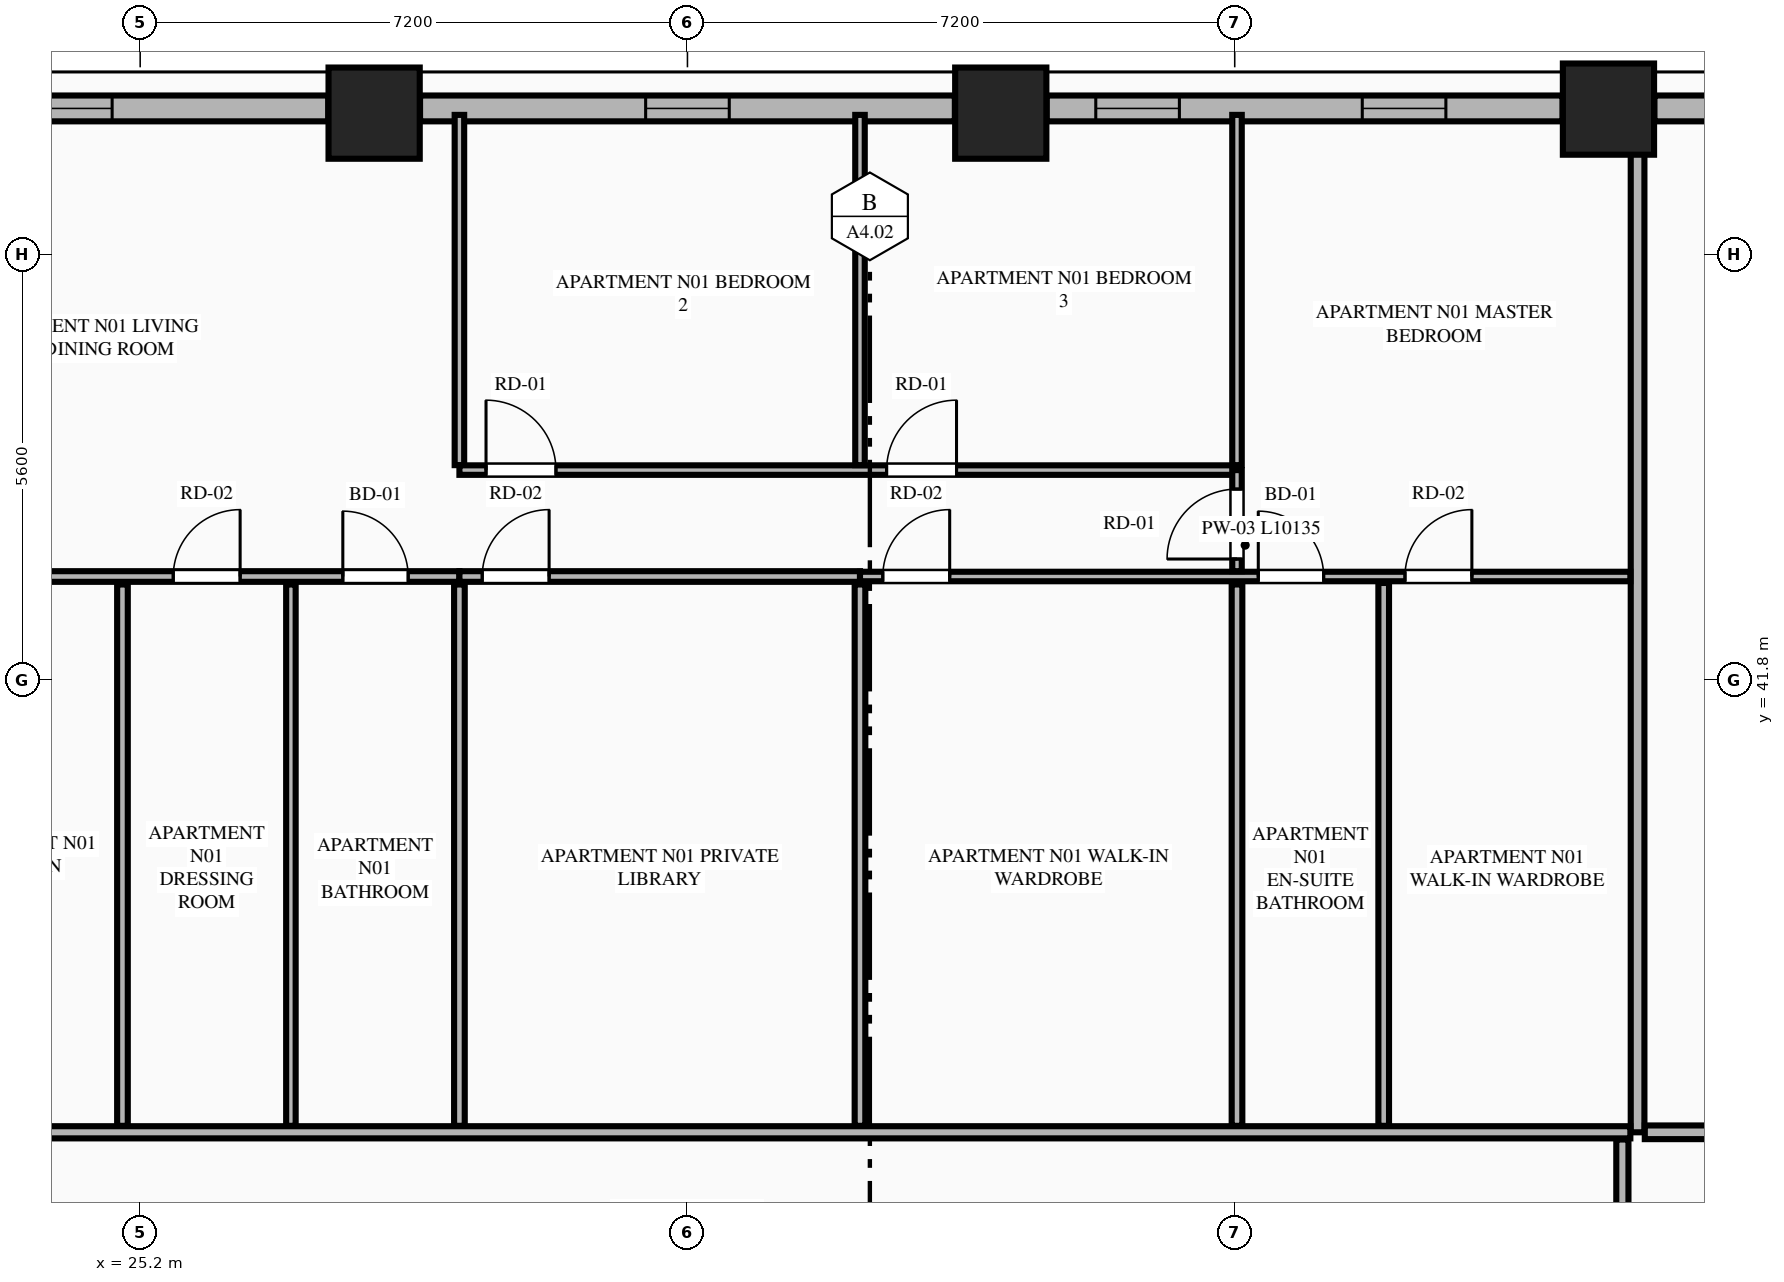
"""IFC4 building model, lengths in metres.
Left out: names, types, materials, properties, quantities, classifications, styles, units other than length and angle.
Written with IfcOpenShell. Run it as: python <this file> out.ifc"""

import sys

from ifc_helpers import new_model, si_unit, direction, frame, frame_2d, origin, origin_2d, place, context, subcontext, project, spatial, rectangle, extrude, element, fill, save


model = new_model("IFC4")
c1 = context("Model", 3, precision=1e-05, world=origin(), true_north=direction((0.0, 1.0)))
c2 = subcontext(c1, "Body", "Model", "MODEL_VIEW")
j1 = project(units=[si_unit("LENGTHUNIT", "METRE"), si_unit("PLANEANGLEUNIT", "RADIAN")], contexts=[c1])
p1 = place(None, origin())
s1 = spatial("IfcSite", under=j1, at=p1, CompositionType="ELEMENT")
p2 = place(p1, origin())
s2 = spatial("IfcBuilding", under=s1, at=p2, CompositionType="ELEMENT")
p3 = place(p2, frame((0.0, 0.0, 39.1)))
s3 = spatial("IfcBuildingStorey", under=s2, at=p3, CompositionType="ELEMENT", Elevation=39.1)
for number, where, z_axis, x_axis in (
    (1, (44.517, 49.311, 0.0), (0.0, 0.0, 1.0), (1.0, 0.0, 0.0)),
    (2, (36.522, 49.258, 0.0), (0.0, 0.0, 1.0), (1.0, 0.0, 0.0)),
    (3, (28.278, 49.258, 0.0), (0.0, 0.0, 1.0), (1.0, 0.0, 0.0)),
):
    element("IfcColumn", number, at=place(p3, frame(where, z_axis=z_axis, x_axis=x_axis)), inside=s3, PredefinedType="COLUMN", context=c2, shape_type="SweptSolid", body=[
        extrude(rectangle(XDim=1.2, YDim=1.2, at=origin_2d()), origin(), (0.0, 0.0, 1.0), 3.55),
    ])
p4 = place(p3, frame((46.366, 49.32, 0.0), z_axis=(0.0, 0.0, 1.0), x_axis=(-1.0, 0.0, 0.0)))
e4 = element("IfcWall", 4, at=p4, inside=s3, PredefinedType="STANDARD", context=c2, shape_type="SweptSolid", body=[
    extrude(rectangle(XDim=1.245, YDim=0.34, at=frame_2d((0.623, 0.0))), origin(), (0.0, 0.0, 1.0), 3.33),
])
p5 = place(p3, frame((43.913, 49.32, 0.0), z_axis=(0.0, 0.0, 1.0), x_axis=(-1.0, 0.0, 0.0)))
e5 = element("IfcWall", 5, at=p5, inside=s3, PredefinedType="STANDARD", context=c2, shape_type="SweptSolid", body=[
    extrude(rectangle(XDim=6.787, YDim=0.34, at=frame_2d((3.394, 0.0))), origin(), (0.0, 0.0, 1.0), 2.787),
])
p6 = place(p5, frame((1.535, 0.0, 0.75)))
e6 = element("IfcOpeningElement", 6, at=p6, cuts=e5, PredefinedType="OPENING", context=c2, shape_type="SweptSolid", body=[
    extrude(rectangle(XDim=1.1, YDim=1.887, at=frame_2d((0.55, 0.943))), frame((0.0, 0.18, 0.0), z_axis=(0.0, -1.0, 0.0), x_axis=(1.0, 0.0, 0.0)), (0.0, 0.0, 1.0), 0.36),
])
p7 = place(p5, frame((5.041, 0.0, 0.75)))
e7 = element("IfcOpeningElement", 7, at=p7, cuts=e5, PredefinedType="OPENING", context=c2, shape_type="SweptSolid", body=[
    extrude(rectangle(XDim=1.1, YDim=1.887, at=frame_2d((0.55, 0.943))), frame((0.0, 0.18, 0.0), z_axis=(0.0, -1.0, 0.0), x_axis=(1.0, 0.0, 0.0)), (0.0, 0.0, 1.0), 0.36),
])
p8 = place(p3, frame((35.918, 49.32, 0.0), z_axis=(0.0, 0.0, 1.0), x_axis=(-1.0, 0.0, 0.0)))
e8 = element("IfcWall", 8, at=p8, inside=s3, PredefinedType="STANDARD", context=c2, shape_type="SweptSolid", body=[
    extrude(rectangle(XDim=7.036, YDim=0.34, at=frame_2d((3.518, 0.0))), origin(), (0.0, 0.0, 1.0), 2.787),
])
p9 = place(p8, frame((2.968, 0.0, 0.75)))
e9 = element("IfcOpeningElement", 9, at=p9, cuts=e8, PredefinedType="OPENING", context=c2, shape_type="SweptSolid", body=[
    extrude(rectangle(XDim=1.1, YDim=1.887, at=frame_2d((0.55, 0.943))), frame((0.0, 0.18, 0.0), z_axis=(0.0, -1.0, 0.0), x_axis=(1.0, 0.0, 0.0)), (0.0, 0.0, 1.0), 0.36),
])
p10 = place(p3, frame((27.674, 49.32, 0.0), z_axis=(0.0, 0.0, 1.0), x_axis=(-1.0, 0.0, 0.0)))
e10 = element("IfcWall", 10, at=p10, inside=s3, PredefinedType="STANDARD", context=c2, shape_type="SweptSolid", body=[
    extrude(rectangle(XDim=6.787, YDim=0.34, at=frame_2d((3.394, 0.0))), origin(), (0.0, 0.0, 1.0), 2.787),
])
p11 = place(p10, frame((2.843, 0.0, 0.75)))
e11 = element("IfcOpeningElement", 11, at=p11, cuts=e10, PredefinedType="OPENING", context=c2, shape_type="SweptSolid", body=[
    extrude(rectangle(XDim=1.1, YDim=1.887, at=frame_2d((0.55, 0.943))), frame((0.0, 0.18, 0.0), z_axis=(0.0, -1.0, 0.0), x_axis=(1.0, 0.0, 0.0)), (0.0, 0.0, 1.0), 0.36),
])
p12 = place(p3, frame((44.9, 35.85, 0.0), z_axis=(0.0, 0.0, 1.0), x_axis=(0.0, 1.0, 0.0)))
e12 = element("IfcWall", 12, at=p12, inside=s3, PredefinedType="PARTITIONING", context=c2, shape_type="SweptSolid", body=[
    extrude(rectangle(XDim=13.295, YDim=0.18, at=frame_2d((6.647, 0.0))), origin(), (0.0, 0.0, 1.0), 3.33),
])
p13 = place(p3, frame((19.995, 35.85, 0.0), z_axis=(0.0, 0.0, 1.0), x_axis=(1.0, 0.0, 0.0)))
e13 = element("IfcWall", 13, at=p13, inside=s3, PredefinedType="PARTITIONING", context=c2, shape_type="SweptSolid", body=[
    extrude(rectangle(XDim=24.81, YDim=0.16, at=frame_2d((12.405, 0.0))), origin(), (0.0, 0.0, 1.0), 3.33),
])
p14 = place(p13, frame((0.705, 0.0, 0.0)))
e14 = element("IfcOpeningElement", 14, at=p14, cuts=e13, PredefinedType="OPENING", context=c2, shape_type="SweptSolid", body=[
    extrude(rectangle(XDim=1.35, YDim=2.35, at=frame_2d((0.675, 1.175))), frame((0.0, 0.09, 0.0), z_axis=(0.0, -1.0, 0.0), x_axis=(1.0, 0.0, 0.0)), (0.0, 0.0, 1.0), 0.18),
])
p15 = place(p3, frame((22.25, 43.162, 0.0), z_axis=(0.0, 0.0, 1.0), x_axis=(1.0, 0.0, 0.0)))
e15 = element("IfcWall", 15, at=p15, inside=s3, PredefinedType="PLUMBINGWALL", context=c2, shape_type="SweptSolid", body=[
    extrude(rectangle(XDim=7.15, YDim=0.14, at=frame_2d((3.575, 0.0))), origin(), (0.0, 0.0, 1.0), 3.33),
])
p16 = place(p15, frame((5.616, 0.0, 0.0)))
e16 = element("IfcOpeningElement", 16, at=p16, cuts=e15, PredefinedType="OPENING", context=c2, shape_type="SweptSolid", body=[
    extrude(rectangle(XDim=0.86, YDim=2.1, at=frame_2d((0.43, 1.05))), frame((0.0, 0.08, 0.0), z_axis=(0.0, -1.0, 0.0), x_axis=(1.0, 0.0, 0.0)), (0.0, 0.0, 1.0), 0.16),
])
p17 = place(p15, frame((0.26, 0.0, 0.0)))
e17 = element("IfcOpeningElement", 17, at=p17, cuts=e15, PredefinedType="OPENING", context=c2, shape_type="SweptSolid", body=[
    extrude(rectangle(XDim=0.88, YDim=2.15, at=frame_2d((0.44, 1.075))), frame((0.0, 0.08, 0.0), z_axis=(0.0, -1.0, 0.0), x_axis=(1.0, 0.0, 0.0)), (0.0, 0.0, 1.0), 0.16),
])
p18 = place(p15, frame((3.385, 0.0, 0.0)))
e18 = element("IfcOpeningElement", 18, at=p18, cuts=e15, PredefinedType="OPENING", context=c2, shape_type="SweptSolid", body=[
    extrude(rectangle(XDim=0.88, YDim=2.15, at=frame_2d((0.44, 1.075))), frame((0.0, 0.08, 0.0), z_axis=(0.0, -1.0, 0.0), x_axis=(1.0, 0.0, 0.0)), (0.0, 0.0, 1.0), 0.16),
])
p19 = place(p3, frame((29.4, 43.162, 0.0), z_axis=(0.0, 0.0, 1.0), x_axis=(1.0, 0.0, 0.0)))
e19 = element("IfcWall", 19, at=p19, inside=s3, PredefinedType="PLUMBINGWALL", context=c2, shape_type="SweptSolid", body=[
    extrude(rectangle(XDim=5.27, YDim=0.14, at=frame_2d((2.635, 0.0))), origin(), (0.0, 0.0, 1.0), 3.33),
])
p20 = place(p19, frame((0.3, 0.0, 0.0)))
e20 = element("IfcOpeningElement", 20, at=p20, cuts=e19, PredefinedType="OPENING", context=c2, shape_type="SweptSolid", body=[
    extrude(rectangle(XDim=0.88, YDim=2.15, at=frame_2d((0.44, 1.075))), frame((0.0, 0.08, 0.0), z_axis=(0.0, -1.0, 0.0), x_axis=(1.0, 0.0, 0.0)), (0.0, 0.0, 1.0), 0.16),
])
p21 = place(p3, frame((34.67, 43.162, 0.0), z_axis=(0.0, 0.0, 1.0), x_axis=(1.0, 0.0, 0.0)))
e21 = element("IfcWall", 21, at=p21, inside=s3, PredefinedType="PARTITIONING", context=c2, shape_type="SweptSolid", body=[
    extrude(rectangle(XDim=10.135, YDim=0.125, at=frame_2d((5.067, 0.0))), origin(), (0.0, 0.0, 1.0), 3.33),
])
p22 = place(p21, frame((5.24, 0.0, 0.0)))
e22 = element("IfcOpeningElement", 22, at=p22, cuts=e21, PredefinedType="OPENING", context=c2, shape_type="SweptSolid", body=[
    extrude(rectangle(XDim=0.86, YDim=2.1, at=frame_2d((0.43, 1.05))), frame((0.0, 0.073, 0.0), z_axis=(0.0, -1.0, 0.0), x_axis=(1.0, 0.0, 0.0)), (0.0, 0.0, 1.0), 0.145),
])
p23 = place(p21, frame((7.17, 0.0, 0.0)))
e23 = element("IfcOpeningElement", 23, at=p23, cuts=e21, PredefinedType="OPENING", context=c2, shape_type="SweptSolid", body=[
    extrude(rectangle(XDim=0.88, YDim=2.15, at=frame_2d((0.44, 1.075))), frame((0.0, 0.073, 0.0), z_axis=(0.0, -1.0, 0.0), x_axis=(1.0, 0.0, 0.0)), (0.0, 0.0, 1.0), 0.145),
])
p24 = place(p21, frame((0.3, 0.0, 0.0)))
e24 = element("IfcOpeningElement", 24, at=p24, cuts=e21, PredefinedType="OPENING", context=c2, shape_type="SweptSolid", body=[
    extrude(rectangle(XDim=0.88, YDim=2.15, at=frame_2d((0.44, 1.075))), frame((0.0, 0.073, 0.0), z_axis=(0.0, -1.0, 0.0), x_axis=(1.0, 0.0, 0.0)), (0.0, 0.0, 1.0), 0.145),
])
p25 = place(p3, frame((24.967, 35.935, 0.0), z_axis=(0.0, 0.0, 1.0), x_axis=(0.0, 1.0, 0.0)))
e25 = element("IfcWall", 25, at=p25, inside=s3, PredefinedType="PLUMBINGWALL", context=c2, shape_type="SweptSolid", body=[
    extrude(rectangle(XDim=7.122, YDim=0.14, at=frame_2d((3.561, 0.0))), origin(), (0.0, 0.0, 1.0), 3.33),
])
p26 = place(p3, frame((27.183, 35.935, 0.0), z_axis=(0.0, 0.0, 1.0), x_axis=(0.0, 1.0, 0.0)))
e26 = element("IfcWall", 26, at=p26, inside=s3, PredefinedType="PARTITIONING", context=c2, shape_type="SweptSolid", body=[
    extrude(rectangle(XDim=7.122, YDim=0.125, at=frame_2d((3.561, 0.0))), origin(), (0.0, 0.0, 1.0), 3.33),
])
p27 = place(p3, frame((29.4, 44.627, 0.0), z_axis=(0.0, 0.0, 1.0), x_axis=(0.0, 1.0, 0.0)))
e27 = element("IfcWall", 27, at=p27, inside=s3, PredefinedType="PARTITIONING", context=c2, shape_type="SweptSolid", body=[
    extrude(rectangle(XDim=4.608, YDim=0.125, at=frame_2d((2.304, 0.0))), origin(), (0.0, 0.0, 1.0), 3.33),
])
p28 = place(p3, frame((29.4, 44.562, 0.0), z_axis=(0.0, 0.0, 1.0), x_axis=(1.0, 0.0, 0.0)))
e28 = element("IfcWall", 28, at=p28, inside=s3, PredefinedType="PARTITIONING", context=c2, shape_type="SweptSolid", body=[
    extrude(rectangle(XDim=10.23, YDim=0.125, at=frame_2d((5.115, 0.0))), origin(), (0.0, 0.0, 1.0), 3.33),
])
p29 = place(p28, frame((0.35, 0.0, 0.0)))
e29 = element("IfcOpeningElement", 29, at=p29, cuts=e28, PredefinedType="OPENING", context=c2, shape_type="SweptSolid", body=[
    extrude(rectangle(XDim=0.92, YDim=2.15, at=frame_2d((0.46, 1.075))), frame((0.0, 0.073, 0.0), z_axis=(0.0, -1.0, 0.0), x_axis=(1.0, 0.0, 0.0)), (0.0, 0.0, 1.0), 0.145),
])
p30 = place(p28, frame((5.62, 0.0, 0.0)))
e30 = element("IfcOpeningElement", 30, at=p30, cuts=e28, PredefinedType="OPENING", context=c2, shape_type="SweptSolid", body=[
    extrude(rectangle(XDim=0.92, YDim=2.15, at=frame_2d((0.46, 1.075))), frame((0.0, 0.073, 0.0), z_axis=(0.0, -1.0, 0.0), x_axis=(1.0, 0.0, 0.0)), (0.0, 0.0, 1.0), 0.145),
])
p31 = place(p3, frame((39.63, 43.232, 0.0), z_axis=(0.0, 0.0, 1.0), x_axis=(0.0, 1.0, 0.0)))
e31 = element("IfcWall", 31, at=p31, inside=s3, PredefinedType="PARTITIONING", context=c2, shape_type="SweptSolid", body=[
    extrude(rectangle(XDim=1.33, YDim=0.125, at=frame_2d((0.665, 0.0))), origin(), (0.0, 0.0, 1.0), 3.33),
])
p32 = place(p31, frame((0.16, 0.0, 0.0)))
e32 = element("IfcOpeningElement", 32, at=p32, cuts=e31, PredefinedType="OPENING", context=c2, shape_type="SweptSolid", body=[
    extrude(rectangle(XDim=0.92, YDim=2.15, at=frame_2d((0.46, 1.075))), frame((0.0, 0.073, 0.0), z_axis=(0.0, -1.0, 0.0), x_axis=(1.0, 0.0, 0.0)), (0.0, 0.0, 1.0), 0.145),
])
for number, where, z_axis, x_axis in (
    (33, (29.4, 35.935, 0.0), (0.0, 0.0, 1.0), (0.0, 1.0, 0.0)),
    (34, (34.67, 35.935, 0.0), (0.0, 0.0, 1.0), (0.0, 1.0, 0.0)),
):
    element("IfcWall", number, at=place(p3, frame(where, z_axis=z_axis, x_axis=x_axis)), inside=s3, PredefinedType="PLUMBINGWALL", context=c2, shape_type="SweptSolid", body=[
        extrude(rectangle(XDim=7.122, YDim=0.14, at=frame_2d((3.561, 0.0))), origin(), (0.0, 0.0, 1.0), 3.33),
    ])
for number, where, z_axis, x_axis in (
    (35, (34.67, 44.627, 0.0), (0.0, 0.0, 1.0), (0.0, 1.0, 0.0)),
    (36, (39.63, 44.627, 0.0), (0.0, 0.0, 1.0), (0.0, 1.0, 0.0)),
):
    element("IfcWall", number, at=place(p3, frame(where, z_axis=z_axis, x_axis=x_axis)), inside=s3, PredefinedType="PARTITIONING", context=c2, shape_type="SweptSolid", body=[
        extrude(rectangle(XDim=4.608, YDim=0.125, at=frame_2d((2.304, 0.0))), origin(), (0.0, 0.0, 1.0), 3.33),
    ])
p33 = place(p3, frame((39.63, 35.935, 0.0), z_axis=(0.0, 0.0, 1.0), x_axis=(0.0, 1.0, 0.0)))
e37 = element("IfcWall", 37, at=p33, inside=s3, PredefinedType="PLUMBINGWALL", context=c2, shape_type="SweptSolid", body=[
    extrude(rectangle(XDim=7.122, YDim=0.14, at=frame_2d((3.561, 0.0))), origin(), (0.0, 0.0, 1.0), 3.33),
])
p34 = place(p3, frame((41.56, 35.935, 0.0), z_axis=(0.0, 0.0, 1.0), x_axis=(0.0, 1.0, 0.0)))
e38 = element("IfcWall", 38, at=p34, inside=s3, PredefinedType="PLUMBINGWALL", context=c2, shape_type="SweptSolid", body=[
    extrude(rectangle(XDim=7.142, YDim=0.14, at=frame_2d((3.571, 0.0))), origin(), (0.0, 0.0, 1.0), 3.33),
])
p35 = place(p3, frame((44.995, 35.85, 0.0), z_axis=(0.0, 0.0, 1.0), x_axis=(1.0, 0.0, 0.0)))
e39 = element("IfcWall", 39, at=p35, inside=s3, PredefinedType="PARTITIONING", context=c2, shape_type="SweptSolid", body=[
    extrude(rectangle(XDim=9.14, YDim=0.18, at=frame_2d((4.57, 0.0))), origin(), (0.0, 0.0, 1.0), 3.33),
])
p36 = place(p3, frame((44.7, 24.403, 0.0), z_axis=(0.0, 0.0, 1.0), x_axis=(0.0, 1.0, 0.0)))
e40 = element("IfcWall", 40, at=p36, inside=s3, PredefinedType="PARTITIONING", context=c2, shape_type="SweptSolid", body=[
    extrude(rectangle(XDim=11.352, YDim=0.16, at=frame_2d((5.676, 0.0))), origin(), (0.0, 0.0, 1.0), 3.33),
])
p37 = place(p36, frame((0.45, 0.0, 0.0)))
e41 = element("IfcOpeningElement", 41, at=p37, cuts=e40, PredefinedType="OPENING", context=c2, shape_type="SweptSolid", body=[
    extrude(rectangle(XDim=1.02, YDim=2.25, at=frame_2d((0.51, 1.125))), frame((0.0, 0.09, 0.0), z_axis=(0.0, -1.0, 0.0), x_axis=(1.0, 0.0, 0.0)), (0.0, 0.0, 1.0), 0.18),
])
p38 = place(p6, origin())
e42 = element("IfcWindow", 42, at=p38, inside=s3, PartitioningType="SINGLE_PANEL", PredefinedType="WINDOW", context=c2, shape_type="SweptSolid", body=[
    extrude(rectangle(XDim=1.1, YDim=1.887, at=frame_2d((0.55, 0.943))), frame((0.0, 0.03, 0.0), z_axis=(0.0, -1.0, 0.0), x_axis=(1.0, 0.0, 0.0)), (0.0, 0.0, 1.0), 0.06),
])
fill(e6, e42)
p39 = place(p9, origin())
e43 = element("IfcWindow", 43, at=p39, inside=s3, PartitioningType="SINGLE_PANEL", PredefinedType="WINDOW", context=c2, shape_type="SweptSolid", body=[
    extrude(rectangle(XDim=1.1, YDim=1.887, at=frame_2d((0.55, 0.943))), frame((0.0, 0.03, 0.0), z_axis=(0.0, -1.0, 0.0), x_axis=(1.0, 0.0, 0.0)), (0.0, 0.0, 1.0), 0.06),
])
fill(e9, e43)
p40 = place(p11, origin())
e44 = element("IfcWindow", 44, at=p40, inside=s3, PartitioningType="SINGLE_PANEL", PredefinedType="WINDOW", context=c2, shape_type="SweptSolid", body=[
    extrude(rectangle(XDim=1.1, YDim=1.887, at=frame_2d((0.55, 0.943))), frame((0.0, 0.03, 0.0), z_axis=(0.0, -1.0, 0.0), x_axis=(1.0, 0.0, 0.0)), (0.0, 0.0, 1.0), 0.06),
])
fill(e11, e44)
p41 = place(p16, origin())
e45 = element("IfcDoor", 45, at=p41, inside=s3, OperationType="SINGLE_SWING_LEFT", PredefinedType="DOOR", context=c2, shape_type="SweptSolid", body=[
    extrude(rectangle(XDim=0.86, YDim=2.1, at=frame_2d((0.43, 1.05))), frame((0.0, 0.025, 0.0), z_axis=(0.0, -1.0, 0.0), x_axis=(1.0, 0.0, 0.0)), (0.0, 0.0, 1.0), 0.05),
])
fill(e16, e45)
p42 = place(p22, origin())
e46 = element("IfcDoor", 46, at=p42, inside=s3, OperationType="SINGLE_SWING_LEFT", PredefinedType="DOOR", context=c2, shape_type="SweptSolid", body=[
    extrude(rectangle(XDim=0.86, YDim=2.1, at=frame_2d((0.43, 1.05))), frame((0.0, 0.025, 0.0), z_axis=(0.0, -1.0, 0.0), x_axis=(1.0, 0.0, 0.0)), (0.0, 0.0, 1.0), 0.05),
])
fill(e22, e46)
p43 = place(p23, origin())
e47 = element("IfcDoor", 47, at=p43, inside=s3, OperationType="SINGLE_SWING_RIGHT", PredefinedType="DOOR", context=c2, shape_type="SweptSolid", body=[
    extrude(rectangle(XDim=0.88, YDim=2.15, at=frame_2d((0.44, 1.075))), frame((0.0, 0.025, 0.0), z_axis=(0.0, -1.0, 0.0), x_axis=(1.0, 0.0, 0.0)), (0.0, 0.0, 1.0), 0.05),
])
fill(e23, e47)
p44 = place(p18, origin())
e48 = element("IfcDoor", 48, at=p44, inside=s3, OperationType="SINGLE_SWING_RIGHT", PredefinedType="DOOR", context=c2, shape_type="SweptSolid", body=[
    extrude(rectangle(XDim=0.88, YDim=2.15, at=frame_2d((0.44, 1.075))), frame((0.0, 0.025, 0.0), z_axis=(0.0, -1.0, 0.0), x_axis=(1.0, 0.0, 0.0)), (0.0, 0.0, 1.0), 0.05),
])
fill(e18, e48)
p45 = place(p20, origin())
e49 = element("IfcDoor", 49, at=p45, inside=s3, OperationType="SINGLE_SWING_RIGHT", PredefinedType="DOOR", context=c2, shape_type="SweptSolid", body=[
    extrude(rectangle(XDim=0.88, YDim=2.15, at=frame_2d((0.44, 1.075))), frame((0.0, 0.025, 0.0), z_axis=(0.0, -1.0, 0.0), x_axis=(1.0, 0.0, 0.0)), (0.0, 0.0, 1.0), 0.05),
])
fill(e20, e49)
p46 = place(p29, origin())
e50 = element("IfcDoor", 50, at=p46, inside=s3, OperationType="SINGLE_SWING_LEFT", PredefinedType="DOOR", context=c2, shape_type="SweptSolid", body=[
    extrude(rectangle(XDim=0.92, YDim=2.15, at=frame_2d((0.46, 1.075))), frame((0.0, 0.025, 0.0), z_axis=(0.0, -1.0, 0.0), x_axis=(1.0, 0.0, 0.0)), (0.0, 0.0, 1.0), 0.05),
])
fill(e29, e50)
p47 = place(p30, origin())
e51 = element("IfcDoor", 51, at=p47, inside=s3, OperationType="SINGLE_SWING_RIGHT", PredefinedType="DOOR", context=c2, shape_type="SweptSolid", body=[
    extrude(rectangle(XDim=0.92, YDim=2.15, at=frame_2d((0.46, 1.075))), frame((0.0, 0.025, 0.0), z_axis=(0.0, -1.0, 0.0), x_axis=(1.0, 0.0, 0.0)), (0.0, 0.0, 1.0), 0.05),
])
fill(e30, e51)
p48 = place(p32, origin())
e52 = element("IfcDoor", 52, at=p48, inside=s3, OperationType="SINGLE_SWING_LEFT", PredefinedType="DOOR", context=c2, shape_type="SweptSolid", body=[
    extrude(rectangle(XDim=0.92, YDim=2.15, at=frame_2d((0.46, 1.075))), frame((0.0, 0.025, 0.0), z_axis=(0.0, -1.0, 0.0), x_axis=(1.0, 0.0, 0.0)), (0.0, 0.0, 1.0), 0.05),
])
fill(e32, e52)
p49 = place(p24, origin())
e53 = element("IfcDoor", 53, at=p49, inside=s3, OperationType="SINGLE_SWING_RIGHT", PredefinedType="DOOR", context=c2, shape_type="SweptSolid", body=[
    extrude(rectangle(XDim=0.88, YDim=2.15, at=frame_2d((0.44, 1.075))), frame((0.0, 0.025, 0.0), z_axis=(0.0, -1.0, 0.0), x_axis=(1.0, 0.0, 0.0)), (0.0, 0.0, 1.0), 0.05),
])
fill(e24, e53)
p50 = place(p7, origin())
e54 = element("IfcWindow", 54, at=p50, inside=s3, PartitioningType="SINGLE_PANEL", PredefinedType="WINDOW", context=c2, shape_type="SweptSolid", body=[
    extrude(rectangle(XDim=1.1, YDim=1.887, at=frame_2d((0.55, 0.943))), frame((0.0, 0.03, 0.0), z_axis=(0.0, -1.0, 0.0), x_axis=(1.0, 0.0, 0.0)), (0.0, 0.0, 1.0), 0.06),
])
fill(e7, e54)
save(model, sys.argv[1])
